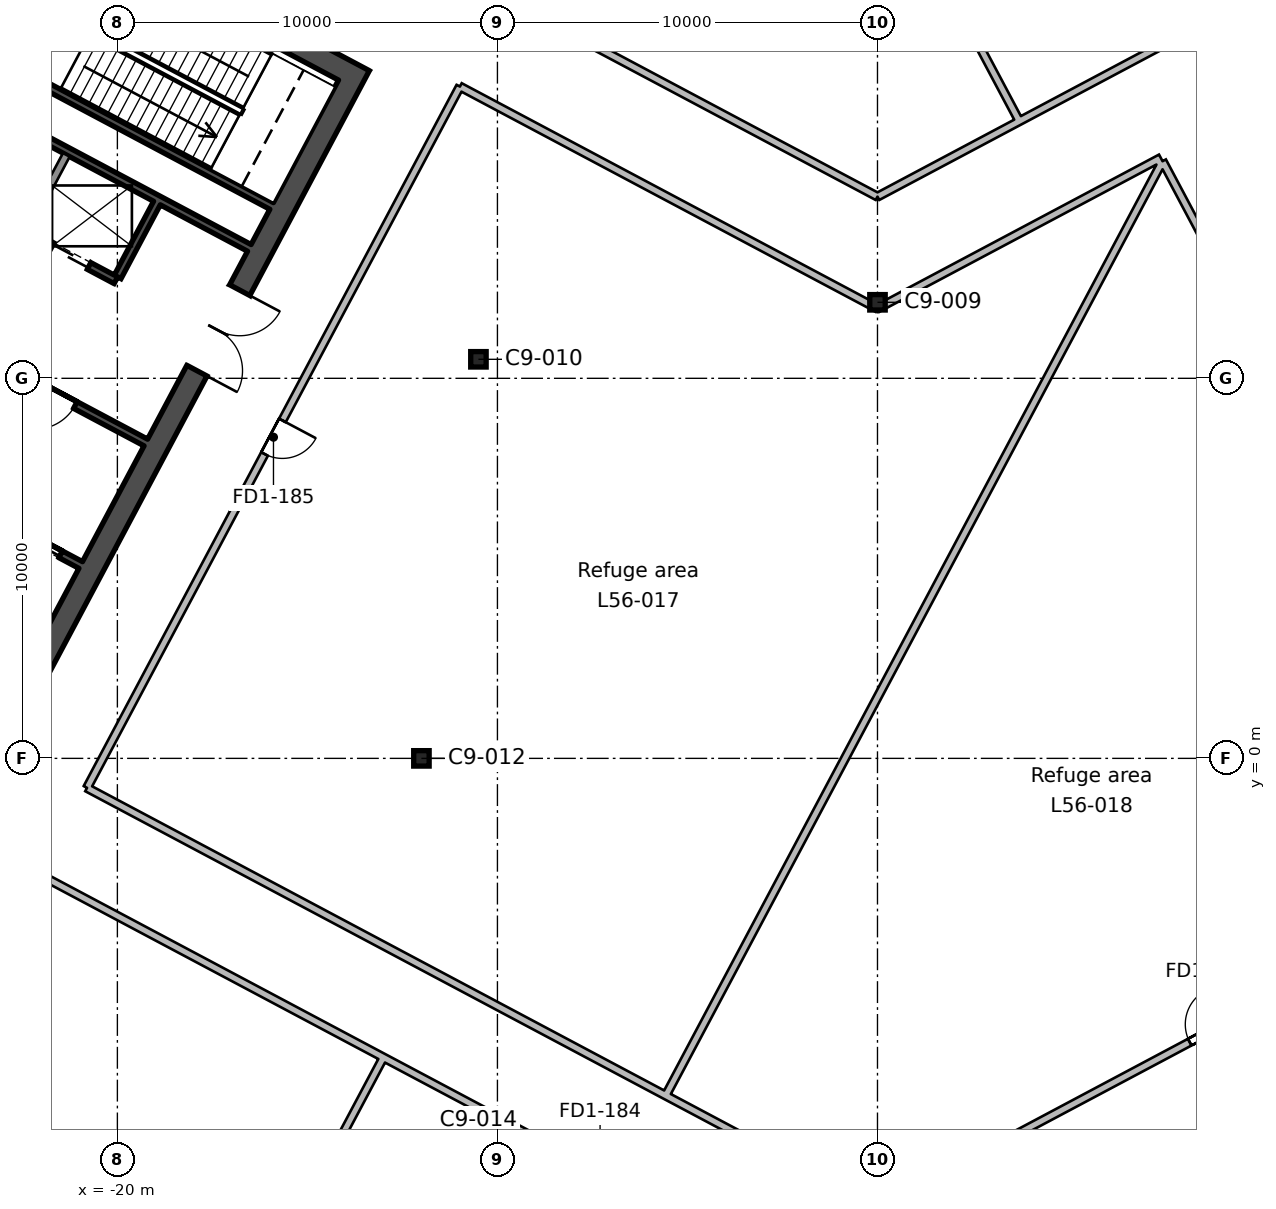
"""IFC4 building model, lengths in metres.
Left out: names, types, materials, properties, quantities, classifications, styles, units other than length and angle.
Written with IfcOpenShell. Run it as: python <this file> out.ifc"""

import sys

from ifc_helpers import new_model, si_unit, direction, frame, frame_2d, origin, origin_2d, place, context, subcontext, project, spatial, rectangle, hollow_rectangle, extrude, element, fill, save


model = new_model("IFC4")
c1 = context("Model", 3, precision=1e-05, world=origin(), true_north=direction((0.0, 1.0)))
c2 = subcontext(c1, "Body", "Model", "MODEL_VIEW")
j1 = project(units=[si_unit("LENGTHUNIT", "METRE"), si_unit("PLANEANGLEUNIT", "RADIAN")], contexts=[c1])
p1 = place(None, origin())
s1 = spatial("IfcSite", under=j1, at=p1, CompositionType="ELEMENT")
p2 = place(p1, origin())
s2 = spatial("IfcBuilding", under=s1, at=p2, CompositionType="ELEMENT")
p3 = place(p2, frame((0.0, 0.0, 252.0)))
s3 = spatial("IfcBuildingStorey", under=s2, at=p3, CompositionType="ELEMENT", Elevation=252.0)
for number, where, z_axis, x_axis in (
    (1, (-12.0, 0.0, 0.0), (0.0, 0.0, 1.0), (1.0, 0.0, 0.0)),
    (2, (-10.5, 10.5, 0.0), (0.0, 0.0, 1.0), (1.0, 0.0, 0.0)),
    (3, (0.0, 12.0, 0.0), (0.0, 0.0, 1.0), (1.0, 0.0, 0.0)),
):
    element("IfcColumn", number, at=place(p3, frame(where, z_axis=z_axis, x_axis=x_axis)), inside=s3, PredefinedType="COLUMN", context=c2, shape_type="SweptSolid", body=[
        extrude(hollow_rectangle(XDim=0.406, YDim=0.406, WallThickness=0.015, InnerFilletRadius=0.007, OuterFilletRadius=0.022, at=origin_2d()), origin(), (0.0, 0.0, 1.0), 6.0),
    ])
p4 = place(p3, frame((-13.635, 18.236, 0.0), z_axis=(0.0, 0.0, 1.0), x_axis=(-0.469478769487, -0.88294376095, 0.0)))
e4 = element("IfcWall", 4, at=p4, inside=s3, PredefinedType="SHEAR", context=c2, shape_type="SweptSolid", body=[
    extrude(rectangle(XDim=19.4, YDim=0.6, at=frame_2d((9.7, 0.0))), origin(), (0.0, 0.0, 1.0), 6.0),
])
p5 = place(p4, frame((6.7, 0.0, 0.0)))
e5 = element("IfcOpeningElement", 5, at=p5, cuts=e4, PredefinedType="OPENING", context=c2, shape_type="SweptSolid", body=[
    extrude(rectangle(XDim=2.4, YDim=2.4, at=frame_2d((1.2, 1.2))), frame((0.0, 0.31, 0.0), z_axis=(0.0, -1.0, 0.0), x_axis=(1.0, 0.0, 0.0)), (0.0, 0.0, 1.0), 0.62),
])
p6 = place(p3, frame((-14.041, 18.112, 0.0), z_axis=(0.0, 0.0, 1.0), x_axis=(-0.882947755831, 0.46947125628, 0.0)))
e6 = element("IfcWall", 6, at=p6, inside=s3, PredefinedType="SHEAR", context=c2, shape_type="SweptSolid", body=[
    extrude(rectangle(XDim=20.2, YDim=0.6, at=frame_2d((10.1, 0.0))), origin(), (0.0, 0.0, 1.0), 6.0),
])
p7 = place(p3, frame((-18.96, 14.611, 0.0), z_axis=(0.0, 0.0, 1.0), x_axis=(-0.4694473164, -0.882960484464, 0.0)))
e7 = element("IfcWall", 7, at=p7, inside=s3, PredefinedType="SHEAR", context=c2, shape_type="SweptSolid", body=[
    extrude(rectangle(XDim=2.2, YDim=0.2, at=frame_2d((1.1, 0.0))), origin(), (0.0, 0.0, 1.0), 6.0),
])
p8 = place(p3, frame((-21.344, 15.879, 0.0), z_axis=(0.0, 0.0, 1.0), x_axis=(-0.4694473164, -0.882960484464, 0.0)))
e8 = element("IfcWall", 8, at=p8, inside=s3, PredefinedType="SOLIDWALL", context=c2, shape_type="SweptSolid", body=[
    extrude(rectangle(XDim=2.2, YDim=0.2, at=frame_2d((1.1, 0.0))), origin(), (0.0, 0.0, 1.0), 6.0),
])
p9 = place(p3, frame((-21.333, 21.649, 0.0), z_axis=(0.0, 0.0, 1.0), x_axis=(-0.469494272526, -0.882935517501, 0.0)))
e9 = element("IfcWall", 9, at=p9, inside=s3, PredefinedType="SHEAR", context=c2, shape_type="SweptSolid", body=[
    extrude(rectangle(XDim=7.3, YDim=0.2, at=frame_2d((3.65, 0.0))), origin(), (0.0, 0.0, 1.0), 6.0),
])
p10 = place(p9, frame((1.3, 0.0, 0.0)))
e10 = element("IfcOpeningElement", 10, at=p10, cuts=e9, PredefinedType="OPENING", context=c2, shape_type="SweptSolid", body=[
    extrude(rectangle(XDim=1.2, YDim=2.1, at=frame_2d((0.6, 1.05))), frame((0.0, 0.11, 0.0), z_axis=(0.0, -1.0, 0.0), x_axis=(1.0, 0.0, 0.0)), (0.0, 0.0, 1.0), 0.22),
])
p11 = place(p3, frame((-15.942, 14.536, 0.0), z_axis=(0.0, 0.0, 1.0), x_axis=(-0.882946947542, 0.469472776449, 0.0)))
e11 = element("IfcWall", 11, at=p11, inside=s3, PredefinedType="SHEAR", context=c2, shape_type="SweptSolid", body=[
    extrude(rectangle(XDim=8.0, YDim=0.2, at=frame_2d((4.0, 0.0))), origin(), (0.0, 0.0, 1.0), 6.0),
])
p12 = place(p3, frame((-16.529, 13.432, 0.0), z_axis=(0.0, 0.0, 1.0), x_axis=(-0.88295287151, 0.469461634952, 0.0)))
e12 = element("IfcWall", 12, at=p12, inside=s3, PredefinedType="SHEAR", context=c2, shape_type="SweptSolid", body=[
    extrude(rectangle(XDim=8.0, YDim=0.2, at=frame_2d((4.0, 0.0))), origin(), (0.0, 0.0, 1.0), 6.0),
])
p13 = place(p3, frame((-20.04, 12.581, 0.0), z_axis=(0.0, 0.0, 1.0), x_axis=(-0.882942972946, 0.469480251476, 0.0)))
e13 = element("IfcWall", 13, at=p13, inside=s3, PredefinedType="SHEAR", context=c2, shape_type="SweptSolid", body=[
    extrude(rectangle(XDim=5.4, YDim=0.2, at=frame_2d((2.7, 0.0))), origin(), (0.0, 0.0, 1.0), 6.0),
])
p14 = place(p13, frame((0.8, 0.0, 0.0)))
e14 = element("IfcOpeningElement", 14, at=p14, cuts=e13, PredefinedType="OPENING", context=c2, shape_type="SweptSolid", body=[
    extrude(rectangle(XDim=1.1, YDim=2.1, at=frame_2d((0.55, 1.05))), frame((0.0, 0.11, 0.0), z_axis=(0.0, -1.0, 0.0), x_axis=(1.0, 0.0, 0.0)), (0.0, 0.0, 1.0), 0.22),
])
p15 = place(p13, frame((3.5, 0.0, 0.0)))
e15 = element("IfcOpeningElement", 15, at=p15, cuts=e13, PredefinedType="OPENING", context=c2, shape_type="SweptSolid", body=[
    extrude(rectangle(XDim=1.1, YDim=2.1, at=frame_2d((0.55, 1.05))), frame((0.0, 0.11, 0.0), z_axis=(0.0, -1.0, 0.0), x_axis=(1.0, 0.0, 0.0)), (0.0, 0.0, 1.0), 0.22),
])
p16 = place(p3, frame((-19.252, 8.311, 0.0), z_axis=(0.0, 0.0, 1.0), x_axis=(-0.882955722218, 0.469456273365, 0.0)))
e16 = element("IfcWall", 16, at=p16, inside=s3, PredefinedType="SHEAR", context=c2, shape_type="SweptSolid", body=[
    extrude(rectangle(XDim=10.0, YDim=0.2, at=frame_2d((5.0, 0.0))), origin(), (0.0, 0.0, 1.0), 6.0),
])
p17 = place(p16, frame((2.1, 0.0, 0.0)))
e17 = element("IfcOpeningElement", 17, at=p17, cuts=e16, PredefinedType="OPENING", context=c2, shape_type="SweptSolid", body=[
    extrude(rectangle(XDim=1.2, YDim=2.1, at=frame_2d((0.6, 1.05))), frame((0.0, 0.11, 0.0), z_axis=(0.0, -1.0, 0.0), x_axis=(1.0, 0.0, 0.0)), (0.0, 0.0, 1.0), 0.22),
])
p18 = place(p3, frame((-20.965, 5.088, 0.0), z_axis=(0.0, 0.0, 1.0), x_axis=(-0.882925986334, 0.469512196493, 0.0)))
e18 = element("IfcWall", 18, at=p18, inside=s3, PredefinedType="SHEAR", context=c2, shape_type="SweptSolid", body=[
    extrude(rectangle(XDim=4.5, YDim=0.2, at=frame_2d((2.25, 0.0))), origin(), (0.0, 0.0, 1.0), 6.0),
])
p19 = place(p18, frame((0.6, 0.0, 0.0)))
e19 = element("IfcOpeningElement", 19, at=p19, cuts=e18, PredefinedType="OPENING", context=c2, shape_type="SweptSolid", body=[
    extrude(rectangle(XDim=1.1, YDim=2.1, at=frame_2d((0.55, 1.05))), frame((0.0, 0.11, 0.0), z_axis=(0.0, -1.0, 0.0), x_axis=(1.0, 0.0, 0.0)), (0.0, 0.0, 1.0), 0.22),
])
p20 = place(p3, frame((-12.995, -7.871, 0.0), z_axis=(0.0, 0.0, 1.0), x_axis=(-0.882943167342, 0.469479885878, 0.0)))
e20 = element("IfcWall", 20, at=p20, inside=s3, PredefinedType="PARTITIONING", context=c2, shape_type="SweptSolid", body=[
    extrude(rectangle(XDim=36.174, YDim=0.2, at=frame_2d((18.087, 0.0))), origin(), (0.0, 0.0, 1.0), 5.55),
])
p21 = place(p20, frame((21.45, 0.0, 0.0)))
e21 = element("IfcOpeningElement", 21, at=p21, cuts=e20, PredefinedType="OPENING", context=c2, shape_type="SweptSolid", body=[
    extrude(rectangle(XDim=1.0, YDim=2.1, at=frame_2d((0.5, 1.05))), frame((0.0, 0.11, 0.0), z_axis=(0.0, -1.0, 0.0), x_axis=(1.0, 0.0, 0.0)), (0.0, 0.0, 1.0), 0.22),
])
p22 = place(p20, frame((17.55, 0.0, 0.0)))
e22 = element("IfcOpeningElement", 22, at=p22, cuts=e20, PredefinedType="OPENING", context=c2, shape_type="SweptSolid", body=[
    extrude(rectangle(XDim=1.0, YDim=2.1, at=frame_2d((0.5, 1.05))), frame((0.0, 0.11, 0.0), z_axis=(0.0, -1.0, 0.0), x_axis=(1.0, 0.0, 0.0)), (0.0, 0.0, 1.0), 0.22),
])
p23 = place(p3, frame((-12.999, -7.868, 0.0), z_axis=(0.0, 0.0, 1.0), x_axis=(-0.46953845473, -0.882912022531, 0.0)))
e23 = element("IfcWall", 23, at=p23, inside=s3, PredefinedType="PARTITIONING", context=c2, shape_type="SweptSolid", body=[
    extrude(rectangle(XDim=8.15, YDim=0.2, at=frame_2d((4.075, 0.0))), origin(), (0.0, 0.0, 1.0), 5.55),
])
p24 = place(p3, frame((-32.682, 32.157, 0.0), z_axis=(0.0, 0.0, 1.0), x_axis=(0.88295110087, -0.469464965118, 0.0)))
e24 = element("IfcWall", 24, at=p24, inside=s3, PredefinedType="PARTITIONING", context=c2, shape_type="SweptSolid", body=[
    extrude(rectangle(XDim=37.014, YDim=0.2, at=frame_2d((18.507, 0.0))), origin(), (0.0, 0.0, 1.0), 5.55),
])
p25 = place(p24, frame((18.05, 0.0, 0.0)))
e25 = element("IfcOpeningElement", 25, at=p25, cuts=e24, PredefinedType="OPENING", context=c2, shape_type="SweptSolid", body=[
    extrude(rectangle(XDim=1.0, YDim=2.1, at=frame_2d((0.5, 1.05))), frame((0.0, 0.11, 0.0), z_axis=(0.0, -1.0, 0.0), x_axis=(1.0, 0.0, 0.0)), (0.0, 0.0, 1.0), 0.22),
])
p26 = place(p24, frame((14.75, 0.0, 0.0)))
e26 = element("IfcOpeningElement", 26, at=p26, cuts=e24, PredefinedType="OPENING", context=c2, shape_type="SweptSolid", body=[
    extrude(rectangle(XDim=1.0, YDim=2.1, at=frame_2d((0.5, 1.05))), frame((0.0, 0.11, 0.0), z_axis=(0.0, -1.0, 0.0), x_axis=(1.0, 0.0, 0.0)), (0.0, 0.0, 1.0), 0.22),
])
p27 = place(p3, frame((0.0, 14.78, 0.0), z_axis=(0.0, 0.0, 1.0), x_axis=(0.882955567988, 0.469456563443, 0.0)))
e27 = element("IfcWall", 27, at=p27, inside=s3, PredefinedType="PARTITIONING", context=c2, shape_type="SweptSolid", body=[
    extrude(rectangle(XDim=33.111, YDim=0.2, at=frame_2d((16.555, 0.0))), origin(), (0.0, 0.0, 1.0), 5.55),
])
p28 = place(p27, frame((16.05, 0.0, 0.0)))
e28 = element("IfcOpeningElement", 28, at=p28, cuts=e27, PredefinedType="OPENING", context=c2, shape_type="SweptSolid", body=[
    extrude(rectangle(XDim=1.0, YDim=2.1, at=frame_2d((0.5, 1.05))), frame((0.0, 0.11, 0.0), z_axis=(0.0, -1.0, 0.0), x_axis=(1.0, 0.0, 0.0)), (0.0, 0.0, 1.0), 0.22),
])
p29 = place(p27, frame((9.95, 0.0, 0.0)))
e29 = element("IfcOpeningElement", 29, at=p29, cuts=e27, PredefinedType="OPENING", context=c2, shape_type="SweptSolid", body=[
    extrude(rectangle(XDim=1.0, YDim=2.1, at=frame_2d((0.5, 1.05))), frame((0.0, 0.11, 0.0), z_axis=(0.0, -1.0, 0.0), x_axis=(1.0, 0.0, 0.0)), (0.0, 0.0, 1.0), 0.22),
])
p30 = place(p3, frame((-0.105, 23.984, 0.0), z_axis=(0.0, 0.0, 1.0), x_axis=(0.469329164555, -0.883023292614, 0.0)))
e30 = element("IfcWall", 30, at=p30, inside=s3, PredefinedType="PARTITIONING", context=c2, shape_type="SweptSolid", body=[
    extrude(rectangle(XDim=8.175, YDim=0.2, at=frame_2d((4.088, 0.0))), origin(), (0.0, 0.0, 1.0), 5.55),
])
p31 = place(p3, frame((-12.995, -7.871, 0.0), z_axis=(0.0, 0.0, 1.0), x_axis=(0.883081189118, -0.469220218475, 0.0)))
e31 = element("IfcWall", 31, at=p31, inside=s3, PredefinedType="PARTITIONING", context=c2, shape_type="SweptSolid", body=[
    extrude(rectangle(XDim=12.908, YDim=0.2, at=frame_2d((6.454, 0.0))), origin(), (0.0, 0.0, 1.0), 5.55),
])
p32 = place(p31, frame((5.95, 0.0, 0.0)))
e32 = element("IfcOpeningElement", 32, at=p32, cuts=e31, PredefinedType="OPENING", context=c2, shape_type="SweptSolid", body=[
    extrude(rectangle(XDim=1.0, YDim=2.1, at=frame_2d((0.5, 1.05))), frame((0.0, 0.11, 0.0), z_axis=(0.0, -1.0, 0.0), x_axis=(1.0, 0.0, 0.0)), (0.0, 0.0, 1.0), 0.22),
])
p33 = place(p3, frame((7.501, 15.713, 0.0), z_axis=(0.0, 0.0, 1.0), x_axis=(-0.46948341094, -0.882941292982, 0.0)))
e33 = element("IfcWall", 33, at=p33, inside=s3, PredefinedType="PARTITIONING", context=c2, shape_type="SweptSolid", body=[
    extrude(rectangle(XDim=27.845, YDim=0.2, at=frame_2d((13.923, 0.0))), origin(), (0.0, 0.0, 1.0), 5.55),
])
p34 = place(p3, frame((-5.572, -8.873, 0.0), z_axis=(0.0, 0.0, 1.0), x_axis=(-0.882928328785, 0.469507791446, 0.0)))
e34 = element("IfcWall", 34, at=p34, inside=s3, PredefinedType="PARTITIONING", context=c2, shape_type="SweptSolid", body=[
    extrude(rectangle(XDim=17.246, YDim=0.2, at=frame_2d((8.623, 0.0))), origin(), (0.0, 0.0, 1.0), 5.55),
])
p35 = place(p3, frame((-20.799, -0.776, 0.0), z_axis=(0.0, 0.0, 1.0), x_axis=(0.469488010228, 0.882938847402, 0.0)))
e35 = element("IfcWall", 35, at=p35, inside=s3, PredefinedType="PARTITIONING", context=c2, shape_type="SweptSolid", body=[
    extrude(rectangle(XDim=20.899, YDim=0.2, at=frame_2d((10.45, 0.0))), origin(), (0.0, 0.0, 1.0), 5.55),
])
p36 = place(p35, frame((9.95, 0.0, 0.0)))
e36 = element("IfcOpeningElement", 36, at=p36, cuts=e35, PredefinedType="OPENING", context=c2, shape_type="SweptSolid", body=[
    extrude(rectangle(XDim=1.0, YDim=2.1, at=frame_2d((0.5, 1.05))), frame((0.0, 0.11, 0.0), z_axis=(0.0, -1.0, 0.0), x_axis=(1.0, 0.0, 0.0)), (0.0, 0.0, 1.0), 0.22),
])
p37 = place(p3, frame((-10.987, 17.677, 0.0), z_axis=(0.0, 0.0, 1.0), x_axis=(0.882943685488, -0.469478911407, 0.0)))
e37 = element("IfcWall", 37, at=p37, inside=s3, PredefinedType="PARTITIONING", context=c2, shape_type="SweptSolid", body=[
    extrude(rectangle(XDim=12.444, YDim=0.2, at=frame_2d((6.222, 0.0))), origin(), (0.0, 0.0, 1.0), 5.55),
])
p38 = place(p3, frame((0.0, 11.835, 0.0), z_axis=(0.0, 0.0, 1.0), x_axis=(0.882938953492, 0.469487810711, 0.0)))
e38 = element("IfcWall", 38, at=p38, inside=s3, PredefinedType="PARTITIONING", context=c2, shape_type="SweptSolid", body=[
    extrude(rectangle(XDim=8.443, YDim=0.2, at=frame_2d((4.222, 0.0))), origin(), (0.0, 0.0, 1.0), 5.55),
])
p39 = place(p3, frame((7.501, 15.713, 0.0), z_axis=(0.0, 0.0, 1.0), x_axis=(0.469480417329, -0.882942884758, 0.0)))
e39 = element("IfcWall", 39, at=p39, inside=s3, PredefinedType="PARTITIONING", context=c2, shape_type="SweptSolid", body=[
    extrude(rectangle(XDim=20.802, YDim=0.2, at=frame_2d((10.401, 0.0))), origin(), (0.0, 0.0, 1.0), 5.55),
])
p40 = place(p3, frame((17.267, -2.654, 0.0), z_axis=(0.0, 0.0, 1.0), x_axis=(-0.882938966386, -0.469487786463, 0.0)))
e40 = element("IfcWall", 40, at=p40, inside=s3, PredefinedType="PARTITIONING", context=c2, shape_type="SweptSolid", body=[
    extrude(rectangle(XDim=19.536, YDim=0.2, at=frame_2d((9.768, 0.0))), origin(), (0.0, 0.0, 1.0), 5.55),
])
p41 = place(p40, frame((9.251, 0.0, 0.0)))
e41 = element("IfcOpeningElement", 41, at=p41, cuts=e40, PredefinedType="OPENING", context=c2, shape_type="SweptSolid", body=[
    extrude(rectangle(XDim=1.0, YDim=2.1, at=frame_2d((0.5, 1.05))), frame((0.0, 0.11, 0.0), z_axis=(0.0, -1.0, 0.0), x_axis=(1.0, 0.0, 0.0)), (0.0, 0.0, 1.0), 0.22),
])
p42 = place(p3, frame((-0.018, -11.826, 0.0), z_axis=(0.0, 0.0, 1.0), x_axis=(-0.882961394428, 0.469445604889, 0.0)))
e42 = element("IfcWall", 42, at=p42, inside=s3, PredefinedType="PARTITIONING", context=c2, shape_type="SweptSolid", body=[
    extrude(rectangle(XDim=6.29, YDim=0.2, at=frame_2d((3.145, 0.0))), origin(), (0.0, 0.0, 1.0), 5.55),
])
p43 = place(p3, frame((30.504, 2.32, 0.0), z_axis=(0.0, 0.0, 1.0), x_axis=(-0.872045563358, -0.489424698424, 0.0)))
e43 = element("IfcWall", 43, at=p43, inside=s3, PredefinedType="PARTITIONING", context=c2, shape_type="SweptSolid", body=[
    extrude(rectangle(XDim=30.45, YDim=0.2, at=frame_2d((15.225, 0.0))), origin(), (0.0, 0.0, 1.0), 5.55),
])
p44 = place(p43, frame((20.85, 0.0, 0.0)))
e44 = element("IfcOpeningElement", 44, at=p44, cuts=e43, PredefinedType="OPENING", context=c2, shape_type="SweptSolid", body=[
    extrude(rectangle(XDim=1.0, YDim=2.1, at=frame_2d((0.5, 1.05))), frame((0.0, 0.11, 0.0), z_axis=(0.0, -1.0, 0.0), x_axis=(1.0, 0.0, 0.0)), (0.0, 0.0, 1.0), 0.22),
])
p45 = place(p43, frame((14.75, 0.0, 0.0)))
e45 = element("IfcOpeningElement", 45, at=p45, cuts=e43, PredefinedType="OPENING", context=c2, shape_type="SweptSolid", body=[
    extrude(rectangle(XDim=1.0, YDim=2.1, at=frame_2d((0.5, 1.05))), frame((0.0, 0.11, 0.0), z_axis=(0.0, -1.0, 0.0), x_axis=(1.0, 0.0, 0.0)), (0.0, 0.0, 1.0), 0.22),
])
p46 = place(p43, frame((4.05, 0.0, 0.0)))
e46 = element("IfcOpeningElement", 46, at=p46, cuts=e43, PredefinedType="OPENING", context=c2, shape_type="SweptSolid", body=[
    extrude(rectangle(XDim=1.0, YDim=2.1, at=frame_2d((0.5, 1.05))), frame((0.0, 0.11, 0.0), z_axis=(0.0, -1.0, 0.0), x_axis=(1.0, 0.0, 0.0)), (0.0, 0.0, 1.0), 0.22),
])
p47 = place(p5, origin())
e47 = element("IfcDoor", 47, at=p47, inside=s3, OperationType="DOUBLE_DOOR_SINGLE_SWING", PredefinedType="DOOR", context=c2, shape_type="SweptSolid", body=[
    extrude(rectangle(XDim=2.4, YDim=2.4, at=frame_2d((1.2, 1.2))), frame((0.0, 0.025, 0.0), z_axis=(0.0, -1.0, 0.0), x_axis=(1.0, 0.0, 0.0)), (0.0, 0.0, 1.0), 0.05),
])
fill(e5, e47)
p48 = place(p17, origin())
e48 = element("IfcDoor", 48, at=p48, inside=s3, OperationType="SINGLE_SWING_RIGHT", PredefinedType="DOOR", context=c2, shape_type="SweptSolid", body=[
    extrude(rectangle(XDim=1.2, YDim=2.1, at=frame_2d((0.6, 1.05))), frame((0.0, 0.025, 0.0), z_axis=(0.0, -1.0, 0.0), x_axis=(1.0, 0.0, 0.0)), (0.0, 0.0, 1.0), 0.05),
])
fill(e17, e48)
p49 = place(p14, origin())
e49 = element("IfcDoor", 49, at=p49, inside=s3, OperationType="DOUBLE_DOOR_SLIDING", PredefinedType="DOOR", context=c2, shape_type="SweptSolid", body=[
    extrude(rectangle(XDim=1.1, YDim=2.1, at=frame_2d((0.55, 1.05))), frame((0.0, 0.025, 0.0), z_axis=(0.0, -1.0, 0.0), x_axis=(1.0, 0.0, 0.0)), (0.0, 0.0, 1.0), 0.05),
])
fill(e14, e49)
p50 = place(p19, origin())
e50 = element("IfcDoor", 50, at=p50, inside=s3, OperationType="DOUBLE_DOOR_SLIDING", PredefinedType="DOOR", context=c2, shape_type="SweptSolid", body=[
    extrude(rectangle(XDim=1.1, YDim=2.1, at=frame_2d((0.55, 1.05))), frame((0.0, 0.025, 0.0), z_axis=(0.0, -1.0, 0.0), x_axis=(1.0, 0.0, 0.0)), (0.0, 0.0, 1.0), 0.05),
])
fill(e19, e50)
p51 = place(p36, frame((1.0, 0.0, 0.0), z_axis=(0.0, 0.0, 1.0), x_axis=(-1.0, 0.0, 0.0)))
e51 = element("IfcDoor", 51, at=p51, inside=s3, OperationType="SINGLE_SWING_LEFT", PredefinedType="DOOR", context=c2, shape_type="SweptSolid", body=[
    extrude(rectangle(XDim=1.0, YDim=2.1, at=frame_2d((0.5, 1.05))), frame((0.0, 0.025, 0.0), z_axis=(0.0, -1.0, 0.0), x_axis=(1.0, 0.0, 0.0)), (0.0, 0.0, 1.0), 0.05),
])
fill(e36, e51)
p52 = place(p41, frame((1.0, 0.0, 0.0), z_axis=(0.0, 0.0, 1.0), x_axis=(-1.0, 0.0, 0.0)))
e52 = element("IfcDoor", 52, at=p52, inside=s3, OperationType="SINGLE_SWING_RIGHT", PredefinedType="DOOR", context=c2, shape_type="SweptSolid", body=[
    extrude(rectangle(XDim=1.0, YDim=2.1, at=frame_2d((0.5, 1.05))), frame((0.0, 0.025, 0.0), z_axis=(0.0, -1.0, 0.0), x_axis=(1.0, 0.0, 0.0)), (0.0, 0.0, 1.0), 0.05),
])
fill(e41, e52)
save(model, sys.argv[1])
